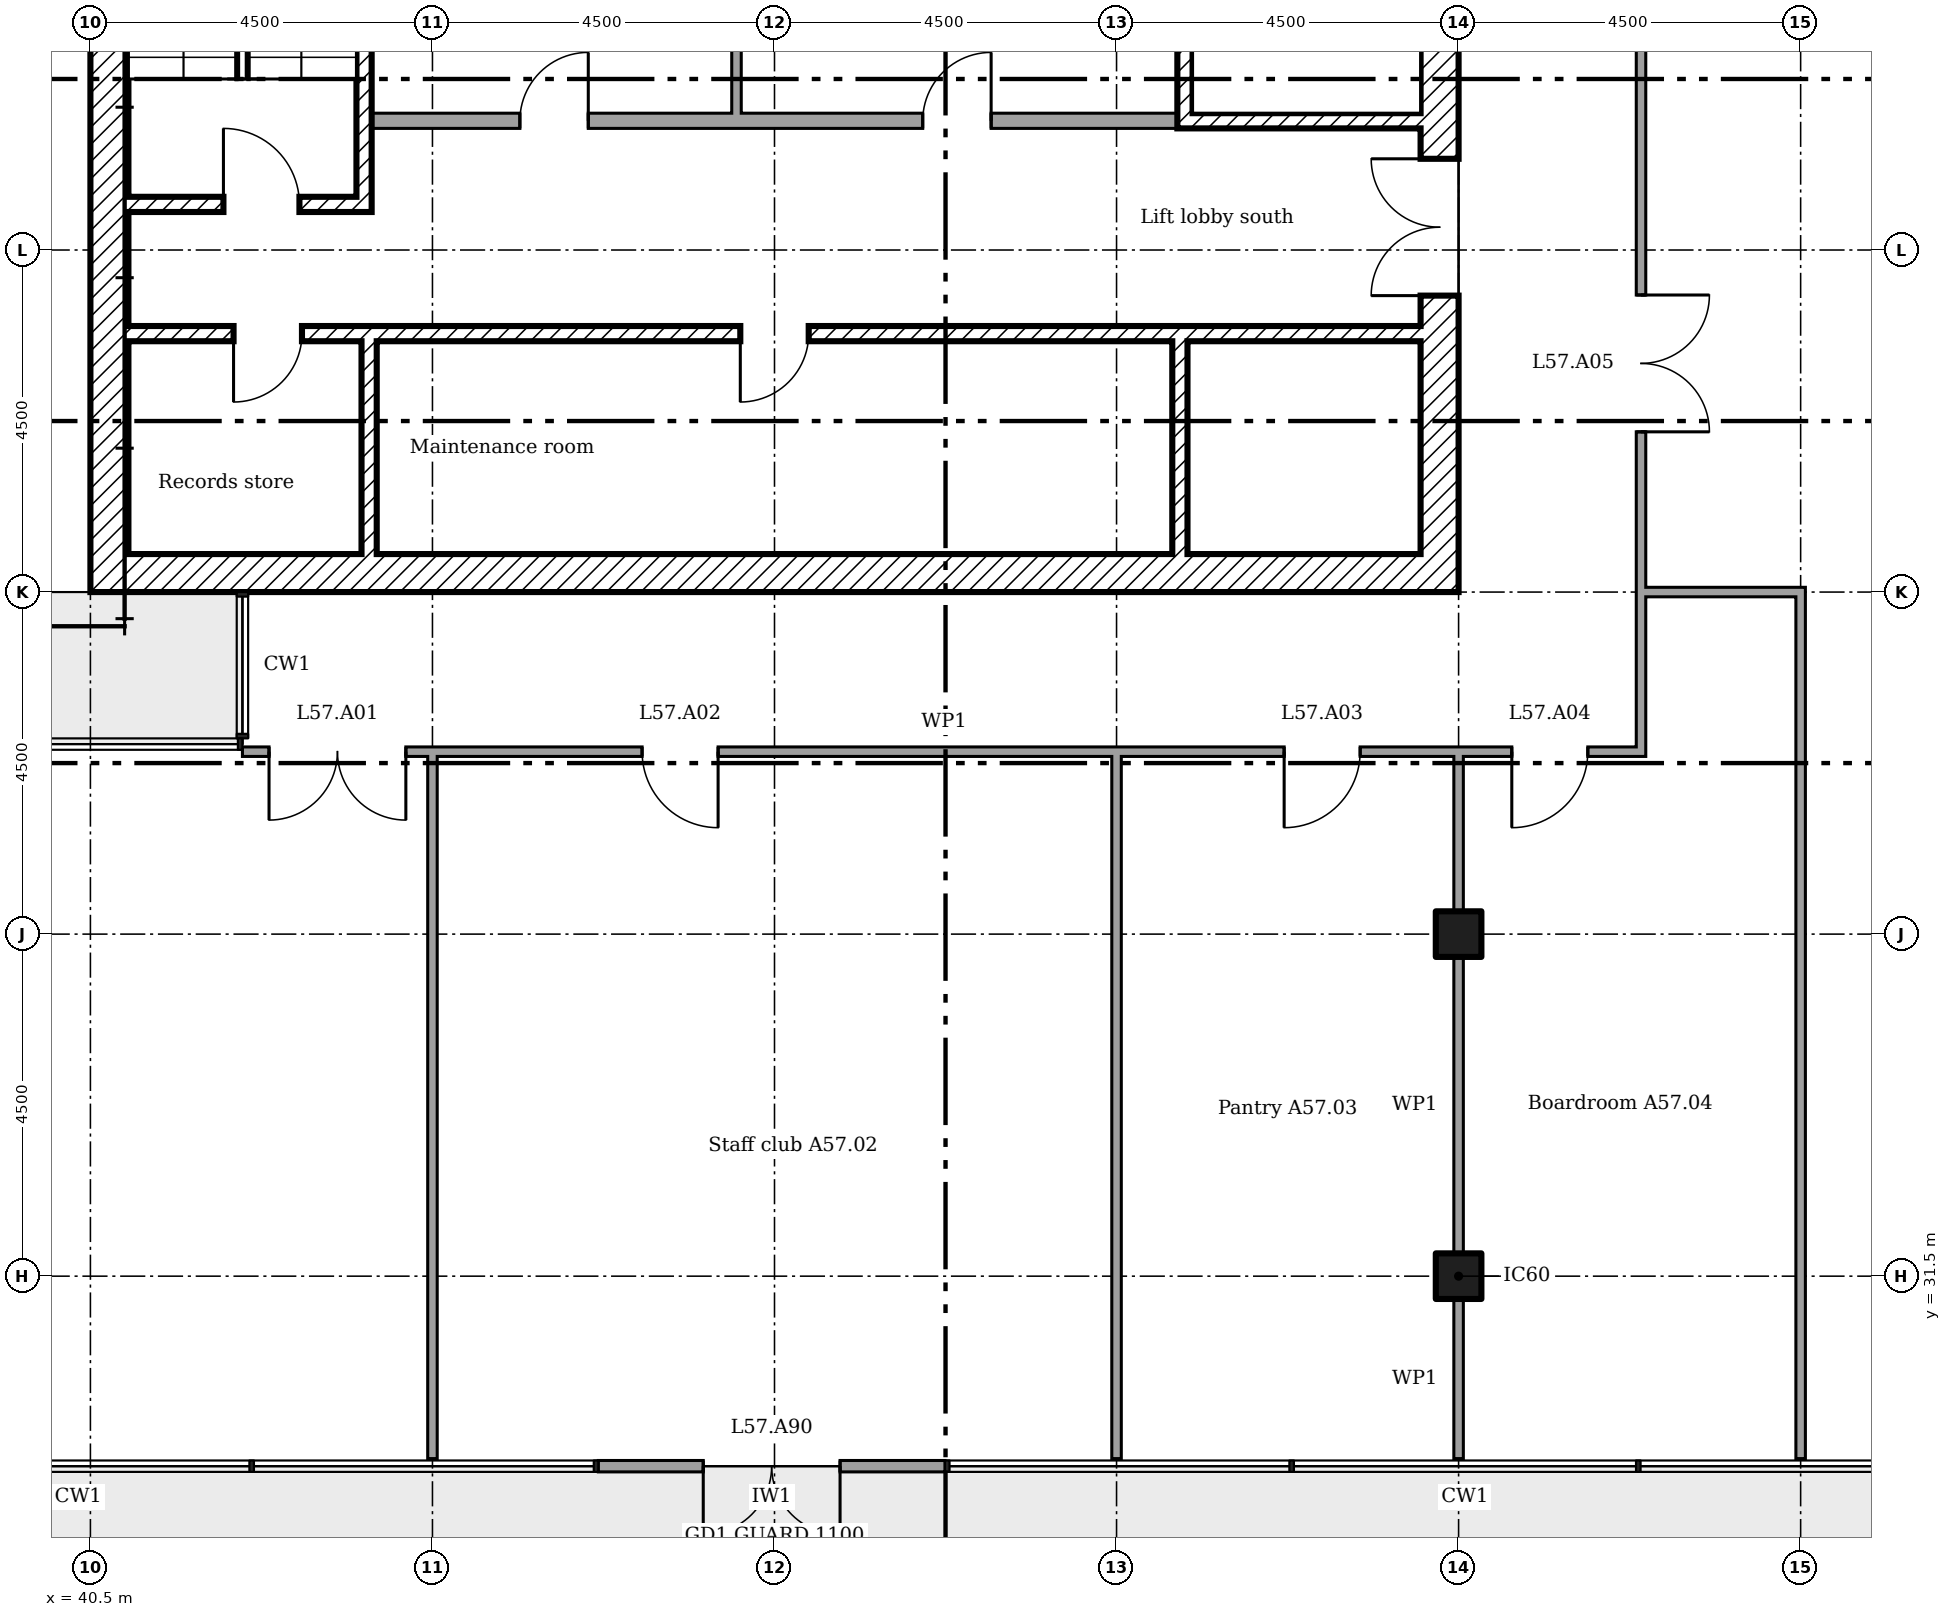
"""IFC4 building model, lengths in metres.
Left out: names, types, materials, properties, quantities, classifications, styles, units other than length and angle.
Written with IfcOpenShell. Run it as: python <this file> out.ifc"""

import sys

from ifc_helpers import new_model, si_unit, direction, frame, frame_2d, origin, origin_2d, place, context, subcontext, project, spatial, rectangle, extrude, element, fill, save


model = new_model("IFC4")
c1 = context("Model", 3, precision=1e-05, world=origin(), true_north=direction((0.0, 1.0)))
c2 = subcontext(c1, "Body", "Model", "MODEL_VIEW")
j1 = project(units=[si_unit("LENGTHUNIT", "METRE"), si_unit("PLANEANGLEUNIT", "RADIAN")], contexts=[c1])
p1 = place(None, origin())
s1 = spatial("IfcSite", under=j1, at=p1, CompositionType="ELEMENT")
p2 = place(p1, origin())
s2 = spatial("IfcBuilding", under=s1, at=p2, CompositionType="ELEMENT")
p3 = place(p2, frame((0.0, 0.0, 224.4)))
s3 = spatial("IfcBuildingStorey", under=s2, at=p3, CompositionType="ELEMENT", Elevation=224.4)
for number, where in (
    (1, (58.5, 31.5, 0.0)),
    (2, (58.5, 36.0, 0.0)),
):
    element("IfcColumn", number, at=place(p3, frame(where)), inside=s3, PredefinedType="COLUMN", context=c2, shape_type="SweptSolid", body=[
        extrude(rectangle(XDim=0.6, YDim=0.6, at=origin_2d()), origin(), (0.0, 0.0, 1.0), 3.6),
    ])
p4 = place(p3, frame((47.182, 29.0, 0.0)))
e3 = element("IfcWall", 3, at=p4, inside=s3, PredefinedType="SOLIDWALL", context=c2, shape_type="SweptSolid", body=[
    extrude(rectangle(XDim=4.561, YDim=0.15, at=frame_2d((2.28, 0.0))), origin(), (0.0, 0.0, 1.0), 3.45),
])
p5 = place(p4, frame((1.38, 0.0, 0.0)))
e4 = element("IfcOpeningElement", 4, at=p5, cuts=e3, PredefinedType="OPENING", context=c2, shape_type="SweptSolid", body=[
    extrude(rectangle(XDim=1.8, YDim=2.4, at=frame_2d((0.9, 1.2))), frame((0.0, 0.085, 0.0), z_axis=(0.0, -1.0, 0.0), x_axis=(1.0, 0.0, 0.0)), (0.0, 0.0, 1.0), 0.17),
])
p6 = place(p3, frame((58.25, 40.5, 0.0), z_axis=(0.0, 0.0, 1.0), x_axis=(0.0, 1.0, 0.0)))
e5 = element("IfcWall", 5, at=p6, inside=s3, PredefinedType="SHEAR", context=c2, shape_type="SweptSolid", body=[
    extrude(rectangle(XDim=18.0, YDim=0.5, at=frame_2d((9.0, 0.0))), origin(), (0.0, 0.0, 1.0), 3.35),
])
p7 = place(p6, frame((13.15, 0.0, 0.0)))
e6 = element("IfcOpeningElement", 6, at=p7, cuts=e5, PredefinedType="OPENING", context=c2, shape_type="SweptSolid", body=[
    extrude(rectangle(XDim=1.2, YDim=2.1, at=frame_2d((0.6, 1.05))), frame((0.0, 0.26, 0.0), z_axis=(0.0, -1.0, 0.0), x_axis=(1.0, 0.0, 0.0)), (0.0, 0.0, 1.0), 0.52),
])
p8 = place(p6, frame((3.9, 0.0, 0.0)))
e7 = element("IfcOpeningElement", 7, at=p8, cuts=e5, PredefinedType="OPENING", context=c2, shape_type="SweptSolid", body=[
    extrude(rectangle(XDim=1.8, YDim=2.1, at=frame_2d((0.9, 1.05))), frame((0.0, 0.26, 0.0), z_axis=(0.0, -1.0, 0.0), x_axis=(1.0, 0.0, 0.0)), (0.0, 0.0, 1.0), 0.52),
])
p9 = place(p6, frame((11.525, 0.0, 0.0)))
e8 = element("IfcOpeningElement", 8, at=p9, cuts=e5, PredefinedType="OPENING", context=c2, shape_type="SweptSolid", body=[
    extrude(rectangle(XDim=1.0, YDim=2.1, at=frame_2d((0.5, 1.05))), frame((0.0, 0.26, 0.0), z_axis=(0.0, -1.0, 0.0), x_axis=(1.0, 0.0, 0.0)), (0.0, 0.0, 1.0), 0.52),
])
p10 = place(p3, frame((40.5, 40.75, 0.0)))
e9 = element("IfcWall", 9, at=p10, inside=s3, PredefinedType="SHEAR", context=c2, shape_type="SweptSolid", body=[
    extrude(rectangle(XDim=17.5, YDim=0.5, at=frame_2d((8.75, 0.0))), origin(), (0.0, 0.0, 1.0), 3.35),
])
p11 = place(p3, frame((40.75, 41.0, 0.0), z_axis=(0.0, 0.0, 1.0), x_axis=(0.0, 1.0, 0.0)))
e10 = element("IfcWall", 10, at=p11, inside=s3, PredefinedType="SHEAR", context=c2, shape_type="SweptSolid", body=[
    extrude(rectangle(XDim=17.0, YDim=0.5, at=frame_2d((8.5, 0.0))), origin(), (0.0, 0.0, 1.0), 3.35),
])
for number, where, z_axis, x_axis in (
    (11, (44.167, 41.0, 0.0), (0.0, 0.0, 1.0), (0.0, 1.0, 0.0)),
    (12, (54.833, 41.0, 0.0), (0.0, 0.0, 1.0), (0.0, 1.0, 0.0)),
):
    element("IfcWall", number, at=place(p3, frame(where, z_axis=z_axis, x_axis=x_axis)), inside=s3, PredefinedType="SHEAR", context=c2, shape_type="SweptSolid", body=[
        extrude(rectangle(XDim=2.8, YDim=0.2, at=frame_2d((1.4, 0.0))), origin(), (0.0, 0.0, 1.0), 3.35),
    ])
p12 = place(p3, frame((41.0, 43.9, 0.0)))
e13 = element("IfcWall", 13, at=p12, inside=s3, PredefinedType="SHEAR", context=c2, shape_type="SweptSolid", body=[
    extrude(rectangle(XDim=17.0, YDim=0.2, at=frame_2d((8.5, 0.0))), origin(), (0.0, 0.0, 1.0), 3.35),
])
p13 = place(p12, frame((1.383, 0.0, 0.0)))
e14 = element("IfcOpeningElement", 14, at=p13, cuts=e13, PredefinedType="OPENING", context=c2, shape_type="SweptSolid", body=[
    extrude(rectangle(XDim=0.9, YDim=2.1, at=frame_2d((0.45, 1.05))), frame((0.0, 0.11, 0.0), z_axis=(0.0, -1.0, 0.0), x_axis=(1.0, 0.0, 0.0)), (0.0, 0.0, 1.0), 0.22),
])
p14 = place(p12, frame((8.05, 0.0, 0.0)))
e15 = element("IfcOpeningElement", 15, at=p14, cuts=e13, PredefinedType="OPENING", context=c2, shape_type="SweptSolid", body=[
    extrude(rectangle(XDim=0.9, YDim=2.1, at=frame_2d((0.45, 1.05))), frame((0.0, 0.11, 0.0), z_axis=(0.0, -1.0, 0.0), x_axis=(1.0, 0.0, 0.0)), (0.0, 0.0, 1.0), 0.22),
])
p15 = place(p3, frame((44.1, 45.5, 0.0), z_axis=(0.0, 0.0, 1.0), x_axis=(0.0, 1.0, 0.0)))
e16 = element("IfcWall", 16, at=p15, inside=s3, PredefinedType="SHEAR", context=c2, shape_type="SweptSolid", body=[
    extrude(rectangle(XDim=6.9, YDim=0.2, at=frame_2d((3.45, 0.0))), origin(), (0.0, 0.0, 1.0), 3.35),
])
p16 = place(p3, frame((41.0, 45.6, 0.0)))
e17 = element("IfcWall", 17, at=p16, inside=s3, PredefinedType="SHEAR", context=c2, shape_type="SweptSolid", body=[
    extrude(rectangle(XDim=3.0, YDim=0.2, at=frame_2d((1.5, 0.0))), origin(), (0.0, 0.0, 1.0), 3.35),
])
p17 = place(p16, frame((1.25, 0.0, 0.0)))
e18 = element("IfcOpeningElement", 18, at=p17, cuts=e17, PredefinedType="OPENING", context=c2, shape_type="SweptSolid", body=[
    extrude(rectangle(XDim=1.0, YDim=2.1, at=frame_2d((0.5, 1.05))), frame((0.0, 0.11, 0.0), z_axis=(0.0, -1.0, 0.0), x_axis=(1.0, 0.0, 0.0)), (0.0, 0.0, 1.0), 0.22),
])
p18 = place(p3, frame((54.8, 46.7, 0.0)))
e19 = element("IfcWall", 19, at=p18, inside=s3, PredefinedType="SHEAR", context=c2, shape_type="SweptSolid", body=[
    extrude(rectangle(XDim=3.2, YDim=0.2, at=frame_2d((1.6, 0.0))), origin(), (0.0, 0.0, 1.0), 3.35),
])
p19 = place(p3, frame((54.9, 46.8, 0.0), z_axis=(0.0, 0.0, 1.0), x_axis=(0.0, 1.0, 0.0)))
e20 = element("IfcWall", 20, at=p19, inside=s3, PredefinedType="SHEAR", context=c2, shape_type="SweptSolid", body=[
    extrude(rectangle(XDim=6.5, YDim=0.2, at=frame_2d((3.25, 0.0))), origin(), (0.0, 0.0, 1.0), 3.35),
])
p20 = place(p3, frame((44.2, 46.7, 0.0)))
e21 = element("IfcWall", 21, at=p20, inside=s3, PredefinedType="PARTITIONING", context=c2, shape_type="SweptSolid", body=[
    extrude(rectangle(XDim=10.6, YDim=0.2, at=frame_2d((5.3, 0.0))), origin(), (0.0, 0.0, 1.0), 3.35),
])
p21 = place(p20, frame((1.95, 0.0, 0.0)))
e22 = element("IfcOpeningElement", 22, at=p21, cuts=e21, PredefinedType="OPENING", context=c2, shape_type="SweptSolid", body=[
    extrude(rectangle(XDim=0.9, YDim=2.1, at=frame_2d((0.45, 1.05))), frame((0.0, 0.11, 0.0), z_axis=(0.0, -1.0, 0.0), x_axis=(1.0, 0.0, 0.0)), (0.0, 0.0, 1.0), 0.22),
])
p22 = place(p20, frame((7.25, 0.0, 0.0)))
e23 = element("IfcOpeningElement", 23, at=p22, cuts=e21, PredefinedType="OPENING", context=c2, shape_type="SweptSolid", body=[
    extrude(rectangle(XDim=0.9, YDim=2.1, at=frame_2d((0.45, 1.05))), frame((0.0, 0.11, 0.0), z_axis=(0.0, -1.0, 0.0), x_axis=(1.0, 0.0, 0.0)), (0.0, 0.0, 1.0), 0.22),
])
p23 = place(p3, frame((49.0, 46.8, 0.0), z_axis=(0.0, 0.0, 1.0), x_axis=(0.0, 1.0, 0.0)))
e24 = element("IfcWall", 24, at=p23, inside=s3, PredefinedType="PARTITIONING", context=c2, shape_type="SweptSolid", body=[
    extrude(rectangle(XDim=2.363, YDim=0.125, at=frame_2d((1.181, 0.0))), origin(), (0.0, 0.0, 1.0), 3.35),
])
p24 = place(p3, frame((42.5, 38.4, 0.0)))
e25 = element("IfcWall", 25, at=p24, inside=s3, PredefinedType="PARTITIONING", context=c2, shape_type="SweptSolid", body=[
    extrude(rectangle(XDim=18.462, YDim=0.125, at=frame_2d((9.231, 0.0))), origin(), (0.0, 0.0, 1.0), 3.45),
])
p25 = place(p24, frame((0.35, 0.0, 0.0)))
e26 = element("IfcOpeningElement", 26, at=p25, cuts=e25, PredefinedType="OPENING", context=c2, shape_type="SweptSolid", body=[
    extrude(rectangle(XDim=1.8, YDim=2.1, at=frame_2d((0.9, 1.05))), frame((0.0, 0.073, 0.0), z_axis=(0.0, -1.0, 0.0), x_axis=(1.0, 0.0, 0.0)), (0.0, 0.0, 1.0), 0.145),
])
p26 = place(p24, frame((5.258, 0.0, 0.0)))
e27 = element("IfcOpeningElement", 27, at=p26, cuts=e25, PredefinedType="OPENING", context=c2, shape_type="SweptSolid", body=[
    extrude(rectangle(XDim=1.0, YDim=2.1, at=frame_2d((0.5, 1.05))), frame((0.0, 0.073, 0.0), z_axis=(0.0, -1.0, 0.0), x_axis=(1.0, 0.0, 0.0)), (0.0, 0.0, 1.0), 0.145),
])
p27 = place(p24, frame((13.705, 0.0, 0.0)))
e28 = element("IfcOpeningElement", 28, at=p27, cuts=e25, PredefinedType="OPENING", context=c2, shape_type="SweptSolid", body=[
    extrude(rectangle(XDim=1.0, YDim=2.1, at=frame_2d((0.5, 1.05))), frame((0.0, 0.073, 0.0), z_axis=(0.0, -1.0, 0.0), x_axis=(1.0, 0.0, 0.0)), (0.0, 0.0, 1.0), 0.145),
])
p28 = place(p24, frame((16.7, 0.0, 0.0)))
e29 = element("IfcOpeningElement", 29, at=p28, cuts=e25, PredefinedType="OPENING", context=c2, shape_type="SweptSolid", body=[
    extrude(rectangle(XDim=1.0, YDim=2.1, at=frame_2d((0.5, 1.05))), frame((0.0, 0.073, 0.0), z_axis=(0.0, -1.0, 0.0), x_axis=(1.0, 0.0, 0.0)), (0.0, 0.0, 1.0), 0.145),
])
p29 = place(p3, frame((60.9, 40.5, 0.0)))
e30 = element("IfcWall", 30, at=p29, inside=s3, PredefinedType="PARTITIONING", context=c2, shape_type="SweptSolid", body=[
    extrude(rectangle(XDim=2.163, YDim=0.125, at=frame_2d((1.081, 0.0))), origin(), (0.0, 0.0, 1.0), 2.772),
])
for number, where, z_axis, x_axis in (
    (31, (45.0, 29.1, 0.0), (0.0, 0.0, 1.0), (0.0, 1.0, 0.0)),
    (32, (54.0, 29.1, 0.0), (0.0, 0.0, 1.0), (0.0, 1.0, 0.0)),
):
    element("IfcWall", number, at=place(p3, frame(where, z_axis=z_axis, x_axis=x_axis)), inside=s3, PredefinedType="PARTITIONING", context=c2, shape_type="SweptSolid", body=[
        extrude(rectangle(XDim=9.3, YDim=0.125, at=frame_2d((4.65, 0.0))), origin(), (0.0, 0.0, 1.0), 2.772),
    ])
p30 = place(p3, frame((58.5, 29.1, 0.0), z_axis=(0.0, 0.0, 1.0), x_axis=(0.0, 1.0, 0.0)))
e33 = element("IfcWall", 33, at=p30, inside=s3, PredefinedType="PARTITIONING", context=c2, shape_type="SweptSolid", body=[
    extrude(rectangle(XDim=2.1, YDim=0.125, at=frame_2d((1.05, 0.0))), origin(), (0.0, 0.0, 1.0), 2.676),
])
p31 = place(p3, frame((58.5, 31.8, 0.0), z_axis=(0.0, 0.0, 1.0), x_axis=(0.0, 1.0, 0.0)))
e34 = element("IfcWall", 34, at=p31, inside=s3, PredefinedType="PARTITIONING", context=c2, shape_type="SweptSolid", body=[
    extrude(rectangle(XDim=3.9, YDim=0.125, at=frame_2d((1.95, 0.0))), origin(), (0.0, 0.0, 1.0), 2.676),
])
p32 = place(p3, frame((58.5, 36.3, 0.0), z_axis=(0.0, 0.0, 1.0), x_axis=(0.0, 1.0, 0.0)))
e35 = element("IfcWall", 35, at=p32, inside=s3, PredefinedType="PARTITIONING", context=c2, shape_type="SweptSolid", body=[
    extrude(rectangle(XDim=2.1, YDim=0.125, at=frame_2d((1.05, 0.0))), origin(), (0.0, 0.0, 1.0), 2.676),
])
p33 = place(p3, frame((60.9, 38.462, 0.0), z_axis=(0.0, 0.0, 1.0), x_axis=(0.0, 1.0, 0.0)))
e36 = element("IfcWall", 36, at=p33, inside=s3, PredefinedType="PARTITIONING", context=c2, shape_type="SweptSolid", body=[
    extrude(rectangle(XDim=9.775, YDim=0.125, at=frame_2d((4.888, 0.0))), origin(), (0.0, 0.0, 1.0), 3.45),
])
p34 = place(p33, frame((4.146, 0.0, 0.0)))
e37 = element("IfcOpeningElement", 37, at=p34, cuts=e36, PredefinedType="OPENING", context=c2, shape_type="SweptSolid", body=[
    extrude(rectangle(XDim=1.8, YDim=2.1, at=frame_2d((0.9, 1.05))), frame((0.0, 0.073, 0.0), z_axis=(0.0, -1.0, 0.0), x_axis=(1.0, 0.0, 0.0)), (0.0, 0.0, 1.0), 0.145),
])
p35 = place(p3, frame((63.0, 29.1, 0.0), z_axis=(0.0, 0.0, 1.0), x_axis=(0.0, 1.0, 0.0)))
e38 = element("IfcWall", 38, at=p35, inside=s3, PredefinedType="PARTITIONING", context=c2, shape_type="SweptSolid", body=[
    extrude(rectangle(XDim=11.337, YDim=0.125, at=frame_2d((5.669, 0.0))), origin(), (0.0, 0.0, 1.0), 3.45),
])
p36 = place(p5, frame((1.8, 0.0, 0.0), x_axis=(-1.0, 0.0, 0.0)))
e39 = element("IfcDoor", 39, at=p36, inside=s3, OperationType="DOUBLE_DOOR_DOUBLE_SWING", PredefinedType="NOTDEFINED", context=c2, shape_type="SweptSolid", body=[
    extrude(rectangle(XDim=1.8, YDim=2.4, at=frame_2d((0.9, 1.2))), frame((0.0, 0.025, 0.0), z_axis=(0.0, -1.0, 0.0), x_axis=(1.0, 0.0, 0.0)), (0.0, 0.0, 1.0), 0.05),
])
fill(e4, e39)
p37 = place(p8, origin())
e40 = element("IfcDoor", 40, at=p37, inside=s3, OperationType="DOUBLE_DOOR_SINGLE_SWING", PredefinedType="DOOR", context=c2, shape_type="SweptSolid", body=[
    extrude(rectangle(XDim=1.8, YDim=2.1, at=frame_2d((0.9, 1.05))), frame((0.0, 0.025, 0.0), z_axis=(0.0, -1.0, 0.0), x_axis=(1.0, 0.0, 0.0)), (0.0, 0.0, 1.0), 0.05),
])
fill(e7, e40)
p38 = place(p17, origin())
e41 = element("IfcDoor", 41, at=p38, inside=s3, OperationType="SINGLE_SWING_RIGHT", PredefinedType="DOOR", context=c2, shape_type="SweptSolid", body=[
    extrude(rectangle(XDim=1.0, YDim=2.1, at=frame_2d((0.5, 1.05))), frame((0.0, 0.025, 0.0), z_axis=(0.0, -1.0, 0.0), x_axis=(1.0, 0.0, 0.0)), (0.0, 0.0, 1.0), 0.05),
])
fill(e18, e41)
p39 = place(p13, frame((0.9, 0.0, 0.0), x_axis=(-1.0, 0.0, 0.0)))
e42 = element("IfcDoor", 42, at=p39, inside=s3, OperationType="SINGLE_SWING_LEFT", PredefinedType="DOOR", context=c2, shape_type="SweptSolid", body=[
    extrude(rectangle(XDim=0.9, YDim=2.1, at=frame_2d((0.45, 1.05))), frame((0.0, 0.025, 0.0), z_axis=(0.0, -1.0, 0.0), x_axis=(1.0, 0.0, 0.0)), (0.0, 0.0, 1.0), 0.05),
])
fill(e14, e42)
p40 = place(p14, frame((0.9, 0.0, 0.0), x_axis=(-1.0, 0.0, 0.0)))
e43 = element("IfcDoor", 43, at=p40, inside=s3, OperationType="SINGLE_SWING_LEFT", PredefinedType="DOOR", context=c2, shape_type="SweptSolid", body=[
    extrude(rectangle(XDim=0.9, YDim=2.1, at=frame_2d((0.45, 1.05))), frame((0.0, 0.025, 0.0), z_axis=(0.0, -1.0, 0.0), x_axis=(1.0, 0.0, 0.0)), (0.0, 0.0, 1.0), 0.05),
])
fill(e15, e43)
p41 = place(p21, origin())
e44 = element("IfcDoor", 44, at=p41, inside=s3, OperationType="SINGLE_SWING_LEFT", PredefinedType="DOOR", context=c2, shape_type="SweptSolid", body=[
    extrude(rectangle(XDim=0.9, YDim=2.1, at=frame_2d((0.45, 1.05))), frame((0.0, 0.025, 0.0), z_axis=(0.0, -1.0, 0.0), x_axis=(1.0, 0.0, 0.0)), (0.0, 0.0, 1.0), 0.05),
])
fill(e22, e44)
p42 = place(p22, origin())
e45 = element("IfcDoor", 45, at=p42, inside=s3, OperationType="SINGLE_SWING_LEFT", PredefinedType="DOOR", context=c2, shape_type="SweptSolid", body=[
    extrude(rectangle(XDim=0.9, YDim=2.1, at=frame_2d((0.45, 1.05))), frame((0.0, 0.025, 0.0), z_axis=(0.0, -1.0, 0.0), x_axis=(1.0, 0.0, 0.0)), (0.0, 0.0, 1.0), 0.05),
])
fill(e23, e45)
p43 = place(p25, frame((1.8, 0.0, 0.0), x_axis=(-1.0, 0.0, 0.0)))
e46 = element("IfcDoor", 46, at=p43, inside=s3, OperationType="DOUBLE_DOOR_SINGLE_SWING", PredefinedType="DOOR", context=c2, shape_type="SweptSolid", body=[
    extrude(rectangle(XDim=1.8, YDim=2.1, at=frame_2d((0.9, 1.05))), frame((0.0, 0.025, 0.0), z_axis=(0.0, -1.0, 0.0), x_axis=(1.0, 0.0, 0.0)), (0.0, 0.0, 1.0), 0.05),
])
fill(e26, e46)
p44 = place(p26, frame((1.0, 0.0, 0.0), x_axis=(-1.0, 0.0, 0.0)))
e47 = element("IfcDoor", 47, at=p44, inside=s3, OperationType="SINGLE_SWING_RIGHT", PredefinedType="DOOR", context=c2, shape_type="SweptSolid", body=[
    extrude(rectangle(XDim=1.0, YDim=2.1, at=frame_2d((0.5, 1.05))), frame((0.0, 0.025, 0.0), z_axis=(0.0, -1.0, 0.0), x_axis=(1.0, 0.0, 0.0)), (0.0, 0.0, 1.0), 0.05),
])
fill(e27, e47)
p45 = place(p27, frame((1.0, 0.0, 0.0), x_axis=(-1.0, 0.0, 0.0)))
e48 = element("IfcDoor", 48, at=p45, inside=s3, OperationType="SINGLE_SWING_LEFT", PredefinedType="DOOR", context=c2, shape_type="SweptSolid", body=[
    extrude(rectangle(XDim=1.0, YDim=2.1, at=frame_2d((0.5, 1.05))), frame((0.0, 0.025, 0.0), z_axis=(0.0, -1.0, 0.0), x_axis=(1.0, 0.0, 0.0)), (0.0, 0.0, 1.0), 0.05),
])
fill(e28, e48)
p46 = place(p28, frame((1.0, 0.0, 0.0), x_axis=(-1.0, 0.0, 0.0)))
e49 = element("IfcDoor", 49, at=p46, inside=s3, OperationType="SINGLE_SWING_LEFT", PredefinedType="DOOR", context=c2, shape_type="SweptSolid", body=[
    extrude(rectangle(XDim=1.0, YDim=2.1, at=frame_2d((0.5, 1.05))), frame((0.0, 0.025, 0.0), z_axis=(0.0, -1.0, 0.0), x_axis=(1.0, 0.0, 0.0)), (0.0, 0.0, 1.0), 0.05),
])
fill(e29, e49)
p47 = place(p34, frame((1.8, 0.0, 0.0), x_axis=(-1.0, 0.0, 0.0)))
e50 = element("IfcDoor", 50, at=p47, inside=s3, OperationType="DOUBLE_DOOR_SINGLE_SWING", PredefinedType="DOOR", context=c2, shape_type="SweptSolid", body=[
    extrude(rectangle(XDim=1.8, YDim=2.1, at=frame_2d((0.9, 1.05))), frame((0.0, 0.025, 0.0), z_axis=(0.0, -1.0, 0.0), x_axis=(1.0, 0.0, 0.0)), (0.0, 0.0, 1.0), 0.05),
])
fill(e37, e50)
save(model, sys.argv[1])
